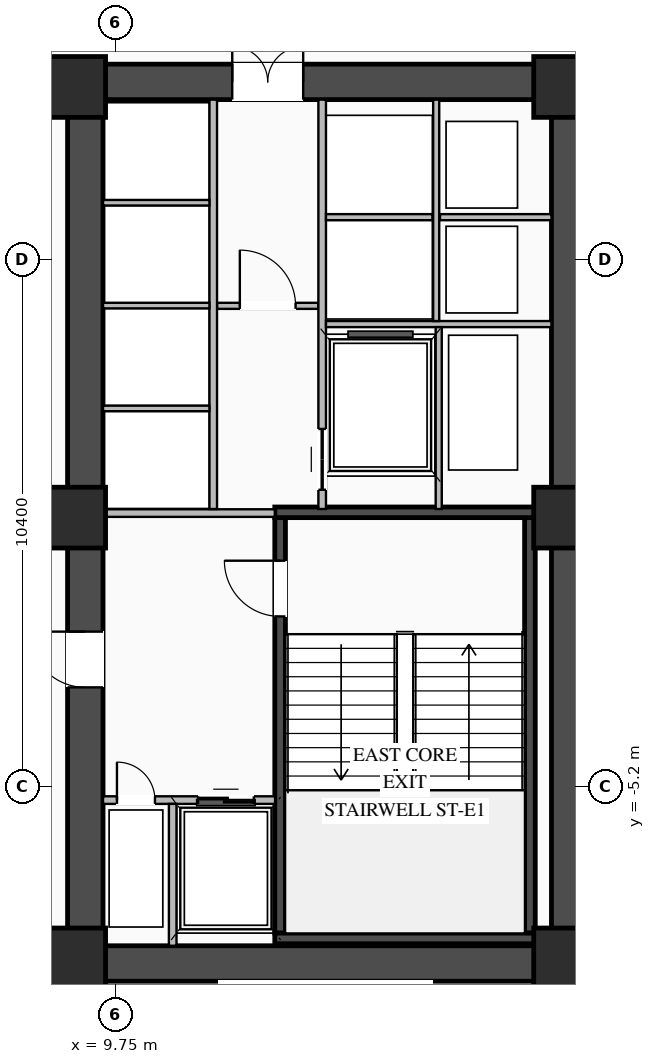
"""IFC4 building model, lengths in metres.
Left out: names, types, materials, properties, quantities, classifications, styles, units other than length and angle.
Written with IfcOpenShell. Run it as: python <this file> out.ifc"""

import sys

from ifc_helpers import new_model, si_unit, direction, frame, frame_2d, origin, origin_2d, place, context, subcontext, project, spatial, rectangle, extrude, element, fill, save


model = new_model("IFC4")
c1 = context("Model", 3, precision=1e-05, world=origin(), true_north=direction((0.0, 1.0)))
c2 = subcontext(c1, "Body", "Model", "MODEL_VIEW")
j1 = project(units=[si_unit("LENGTHUNIT", "METRE"), si_unit("PLANEANGLEUNIT", "RADIAN")], contexts=[c1])
p1 = place(None, origin())
s1 = spatial("IfcSite", under=j1, at=p1, CompositionType="ELEMENT")
p2 = place(p1, origin())
s2 = spatial("IfcBuilding", under=s1, at=p2, CompositionType="ELEMENT")
p3 = place(p2, frame((0.0, 0.0, 18.6)))
s3 = spatial("IfcBuildingStorey", under=s2, at=p3, CompositionType="ELEMENT", Elevation=18.6)
p4 = place(p3, frame((8.8, -8.7, 0.0), z_axis=(0.0, 0.0, 1.0), x_axis=(1.0, 0.0, 0.0)))
e1 = element("IfcWall", 1, at=p4, inside=s3, PredefinedType="SHEAR", context=c2, shape_type="SweptSolid", body=[
    extrude(rectangle(XDim=10.25, YDim=0.7, at=frame_2d((5.125, 0.0))), origin(), (0.0, 0.0, 1.0), 3.95),
])
p5 = place(p3, frame((8.8, 8.7, 0.0), z_axis=(0.0, 0.0, 1.0), x_axis=(1.0, 0.0, 0.0)))
e2 = element("IfcWall", 2, at=p5, inside=s3, PredefinedType="SHEAR", context=c2, shape_type="SweptSolid", body=[
    extrude(rectangle(XDim=10.25, YDim=0.7, at=frame_2d((5.125, 0.0))), origin(), (0.0, 0.0, 1.0), 3.95),
])
p6 = place(p5, frame((3.25, 0.0, 0.0)))
e3 = element("IfcOpeningElement", 3, at=p6, cuts=e2, PredefinedType="OPENING", context=c2, shape_type="SweptSolid", body=[
    extrude(rectangle(XDim=1.4, YDim=2.05, at=frame_2d((0.7, 1.025))), frame((0.0, 0.36, 0.0), z_axis=(0.0, -1.0, 0.0), x_axis=(1.0, 0.0, 0.0)), (0.0, 0.0, 1.0), 0.72),
])
p7 = place(p3, frame((9.15, -8.35, 0.0), z_axis=(0.0, 0.0, 1.0), x_axis=(0.0, 1.0, 0.0)))
e4 = element("IfcWall", 4, at=p7, inside=s3, PredefinedType="SHEAR", context=c2, shape_type="SweptSolid", body=[
    extrude(rectangle(XDim=16.7, YDim=0.7, at=frame_2d((8.35, 0.0))), origin(), (0.0, 0.0, 1.0), 3.95),
])
p8 = place(p7, frame((5.1, 0.0, 0.0)))
e5 = element("IfcOpeningElement", 5, at=p8, cuts=e4, PredefinedType="OPENING", context=c2, shape_type="SweptSolid", body=[
    extrude(rectangle(XDim=1.1, YDim=2.08, at=frame_2d((0.55, 1.04))), frame((0.0, 0.36, 0.0), z_axis=(0.0, -1.0, 0.0), x_axis=(1.0, 0.0, 0.0)), (0.0, 0.0, 1.0), 0.72),
])
p9 = place(p3, frame((18.7, -8.35, 0.0), z_axis=(0.0, 0.0, 1.0), x_axis=(0.0, 1.0, 0.0)))
e6 = element("IfcWall", 6, at=p9, inside=s3, PredefinedType="SHEAR", context=c2, shape_type="SweptSolid", body=[
    extrude(rectangle(XDim=16.7, YDim=0.7, at=frame_2d((8.35, 0.0))), origin(), (0.0, 0.0, 1.0), 3.95),
])
p10 = place(p3, frame((12.995, -8.1, 0.0), z_axis=(0.0, 0.0, 1.0), x_axis=(0.0, 1.0, 0.0)))
e7 = element("IfcWall", 7, at=p10, inside=s3, PredefinedType="SHEAR", context=c2, shape_type="SweptSolid", body=[
    extrude(rectangle(XDim=8.2, YDim=0.21, at=frame_2d((4.1, 0.0))), origin(), (0.0, 0.0, 1.0), 3.95),
])
p11 = place(p10, frame((6.25, 0.0, 0.0)))
e8 = element("IfcOpeningElement", 8, at=p11, cuts=e7, PredefinedType="OPENING", context=c2, shape_type="SweptSolid", body=[
    extrude(rectangle(XDim=1.1, YDim=2.15, at=frame_2d((0.55, 1.075))), frame((0.0, 0.115, 0.0), z_axis=(0.0, -1.0, 0.0), x_axis=(1.0, 0.0, 0.0)), (0.0, 0.0, 1.0), 0.23),
])
p12 = place(p3, frame((17.925, -8.1, 0.0), z_axis=(0.0, 0.0, 1.0), x_axis=(0.0, 1.0, 0.0)))
e9 = element("IfcWall", 9, at=p12, inside=s3, PredefinedType="SHEAR", context=c2, shape_type="SweptSolid", body=[
    extrude(rectangle(XDim=8.2, YDim=0.21, at=frame_2d((4.1, 0.0))), origin(), (0.0, 0.0, 1.0), 3.95),
])
for number, where, z_axis, x_axis in (
    (10, (12.89, -8.205, 0.0), (0.0, 0.0, 1.0), (1.0, 0.0, 0.0)),
    (11, (18.03, 0.205, 0.0), (0.0, 0.0, 1.0), (-1.0, 0.0, 0.0)),
):
    element("IfcWall", number, at=place(p3, frame(where, z_axis=z_axis, x_axis=x_axis)), inside=s3, PredefinedType="SHEAR", context=c2, shape_type="SweptSolid", body=[
        extrude(rectangle(XDim=5.14, YDim=0.21, at=frame_2d((2.57, 0.0))), origin(), (0.0, 0.0, 1.0), 3.95),
    ])
for number, where, z_axis, x_axis in (
    (12, (8.95, -8.6, 0.0), (0.0, 0.0, 1.0), (1.0, 0.0, 0.0)),
    (13, (8.95, 0.1, 0.0), (0.0, 0.0, 1.0), (1.0, 0.0, 0.0)),
    (14, (8.95, 8.6, 0.0), (0.0, 0.0, 1.0), (1.0, 0.0, 0.0)),
    (15, (18.6, -8.6, 0.0), (0.0, 0.0, 1.0), (1.0, 0.0, 0.0)),
    (16, (18.6, 0.1, 0.0), (0.0, 0.0, 1.0), (1.0, 0.0, 0.0)),
    (17, (18.6, 8.6, 0.0), (0.0, 0.0, 1.0), (1.0, 0.0, 0.0)),
):
    element("IfcColumn", number, at=place(p3, frame(where, z_axis=z_axis, x_axis=x_axis)), inside=s3, PredefinedType="COLUMN", context=c2, shape_type="SweptSolid", body=[
        extrude(rectangle(XDim=1.2, YDim=1.2, at=origin_2d()), origin(), (0.0, 0.0, 1.0), 4.2),
    ])
p13 = place(p3, frame((9.5, -5.475, 0.0), z_axis=(0.0, 0.0, 1.0), x_axis=(1.0, 0.0, 0.0)))
e18 = element("IfcWall", 18, at=p13, inside=s3, PredefinedType="STANDARD", context=c2, shape_type="SweptSolid", body=[
    extrude(rectangle(XDim=3.395, YDim=0.15, at=frame_2d((1.698, 0.0))), origin(), (0.0, 0.0, 1.0), 3.93),
])
p14 = place(p13, frame((1.875, 0.0, 0.0)))
e19 = element("IfcOpeningElement", 19, at=p14, cuts=e18, PredefinedType="OPENING", context=c2, shape_type="SweptSolid", body=[
    extrude(rectangle(XDim=1.1, YDim=2.15, at=frame_2d((0.55, 1.075))), frame((0.0, 0.085, 0.0), z_axis=(0.0, -1.0, 0.0), x_axis=(1.0, 0.0, 0.0)), (0.0, 0.0, 1.0), 0.17),
])
p15 = place(p13, frame((0.275, 0.0, 0.0)))
e20 = element("IfcOpeningElement", 20, at=p15, cuts=e18, PredefinedType="OPENING", context=c2, shape_type="SweptSolid", body=[
    extrude(rectangle(XDim=0.75, YDim=2.05, at=frame_2d((0.375, 1.025))), frame((0.0, 0.085, 0.0), z_axis=(0.0, -1.0, 0.0), x_axis=(1.0, 0.0, 0.0)), (0.0, 0.0, 1.0), 0.17),
])
p16 = place(p3, frame((10.875, -8.35, 0.0), z_axis=(0.0, 0.0, 1.0), x_axis=(0.0, 1.0, 0.0)))
e21 = element("IfcWall", 21, at=p16, inside=s3, PredefinedType="STANDARD", context=c2, shape_type="SweptSolid", body=[
    extrude(rectangle(XDim=2.8, YDim=0.15, at=frame_2d((1.4, 0.0))), origin(), (0.0, 0.0, 1.0), 3.93),
])
p17 = place(p3, frame((9.5, 0.19, 0.0), z_axis=(0.0, 0.0, 1.0), x_axis=(1.0, 0.0, 0.0)))
e22 = element("IfcWall", 22, at=p17, inside=s3, PredefinedType="STANDARD", context=c2, shape_type="SweptSolid", body=[
    extrude(rectangle(XDim=3.39, YDim=0.15, at=frame_2d((1.695, 0.0))), origin(), (0.0, 0.0, 1.0), 3.225),
])
p18 = place(p3, frame((11.75, 4.28, 0.0), z_axis=(0.0, 0.0, 1.0), x_axis=(1.0, 0.0, 0.0)))
e23 = element("IfcWall", 23, at=p18, inside=s3, PredefinedType="STANDARD", context=c2, shape_type="SweptSolid", body=[
    extrude(rectangle(XDim=2.0, YDim=0.12, at=frame_2d((1.0, 0.0))), origin(), (0.0, 0.0, 1.0), 3.93),
])
p19 = place(p18, frame((0.45, 0.0, 0.0)))
e24 = element("IfcOpeningElement", 24, at=p19, cuts=e23, PredefinedType="OPENING", context=c2, shape_type="SweptSolid", body=[
    extrude(rectangle(XDim=1.1, YDim=2.1, at=frame_2d((0.55, 1.05))), frame((0.0, 0.07, 0.0), z_axis=(0.0, -1.0, 0.0), x_axis=(1.0, 0.0, 0.0)), (0.0, 0.0, 1.0), 0.14),
])
p20 = place(p3, frame((11.675, 0.27, 0.0), z_axis=(0.0, 0.0, 1.0), x_axis=(0.0, 1.0, 0.0)))
e25 = element("IfcWall", 25, at=p20, inside=s3, PredefinedType="STANDARD", context=c2, shape_type="SweptSolid", body=[
    extrude(rectangle(XDim=8.08, YDim=0.15, at=frame_2d((4.04, 0.0))), origin(), (0.0, 0.0, 1.0), 3.93),
])
for number, where, z_axis, x_axis in (
    (26, (9.5, 2.255, 0.0), (0.0, 0.0, 1.0), (1.0, 0.0, 0.0)),
    (27, (9.5, 4.285, 0.0), (0.0, 0.0, 1.0), (1.0, 0.0, 0.0)),
    (28, (9.5, 6.315, 0.0), (0.0, 0.0, 1.0), (1.0, 0.0, 0.0)),
):
    element("IfcWall", number, at=place(p3, frame(where, z_axis=z_axis, x_axis=x_axis)), inside=s3, PredefinedType="STANDARD", context=c2, shape_type="SweptSolid", body=[
        extrude(rectangle(XDim=2.1, YDim=0.11, at=frame_2d((1.05, 0.0))), origin(), (0.0, 0.0, 1.0), 3.93),
    ])
p21 = place(p3, frame((13.825, 0.27, 0.0), z_axis=(0.0, 0.0, 1.0), x_axis=(0.0, 1.0, 0.0)))
e29 = element("IfcWall", 29, at=p21, inside=s3, PredefinedType="STANDARD", context=c2, shape_type="SweptSolid", body=[
    extrude(rectangle(XDim=8.08, YDim=0.15, at=frame_2d((4.04, 0.0))), origin(), (0.0, 0.0, 1.0), 3.93),
])
p22 = place(p21, frame((0.38, 0.0, 0.0)))
e30 = element("IfcOpeningElement", 30, at=p22, cuts=e29, PredefinedType="OPENING", context=c2, shape_type="SweptSolid", body=[
    extrude(rectangle(XDim=1.2, YDim=2.1, at=frame_2d((0.6, 1.05))), frame((0.0, 0.085, 0.0), z_axis=(0.0, -1.0, 0.0), x_axis=(1.0, 0.0, 0.0)), (0.0, 0.0, 1.0), 0.17),
])
p23 = place(p3, frame((13.9, 3.92, 0.0), z_axis=(0.0, 0.0, 1.0), x_axis=(1.0, 0.0, 0.0)))
e31 = element("IfcWall", 31, at=p23, inside=s3, PredefinedType="STANDARD", context=c2, shape_type="SweptSolid", body=[
    extrude(rectangle(XDim=4.45, YDim=0.12, at=frame_2d((2.225, 0.0))), origin(), (0.0, 0.0, 1.0), 3.93),
])
p24 = place(p3, frame((16.15, 6.03, 0.0), z_axis=(0.0, 0.0, 1.0), x_axis=(1.0, 0.0, 0.0)))
e32 = element("IfcWall", 32, at=p24, inside=s3, PredefinedType="STANDARD", context=c2, shape_type="SweptSolid", body=[
    extrude(rectangle(XDim=2.2, YDim=0.12, at=frame_2d((1.1, 0.0))), origin(), (0.0, 0.0, 1.0), 3.93),
])
p25 = place(p3, frame((16.075, 3.98, 0.0), z_axis=(0.0, 0.0, 1.0), x_axis=(0.0, 1.0, 0.0)))
e33 = element("IfcWall", 33, at=p25, inside=s3, PredefinedType="STANDARD", context=c2, shape_type="SweptSolid", body=[
    extrude(rectangle(XDim=4.37, YDim=0.12, at=frame_2d((2.185, 0.0))), origin(), (0.0, 0.0, 1.0), 3.93),
])
p26 = place(p3, frame((13.9, 6.03, 0.0), z_axis=(0.0, 0.0, 1.0), x_axis=(1.0, 0.0, 0.0)))
e34 = element("IfcWall", 34, at=p26, inside=s3, PredefinedType="STANDARD", context=c2, shape_type="SweptSolid", body=[
    extrude(rectangle(XDim=2.1, YDim=0.12, at=frame_2d((1.05, 0.0))), origin(), (0.0, 0.0, 1.0), 3.93),
])
p27 = place(p3, frame((16.125, 0.27, 0.0), z_axis=(0.0, 0.0, 1.0), x_axis=(0.0, 1.0, 0.0)))
e35 = element("IfcWall", 35, at=p27, inside=s3, PredefinedType="STANDARD", context=c2, shape_type="SweptSolid", body=[
    extrude(rectangle(XDim=3.59, YDim=0.12, at=frame_2d((1.795, 0.0))), origin(), (0.0, 0.0, 1.0), 3.93),
])
p28 = place(p11, origin())
e36 = element("IfcDoor", 36, at=p28, inside=s3, OperationType="SINGLE_SWING_RIGHT", PredefinedType="DOOR", context=c2, shape_type="SweptSolid", body=[
    extrude(rectangle(XDim=1.1, YDim=2.15, at=frame_2d((0.55, 1.075))), frame((0.0, 0.025, 0.0), z_axis=(0.0, -1.0, 0.0), x_axis=(1.0, 0.0, 0.0)), (0.0, 0.0, 1.0), 0.05),
])
fill(e8, e36)
p29 = place(p14, origin())
e37 = element("IfcDoor", 37, at=p29, inside=s3, OperationType="DOUBLE_DOOR_SLIDING", PredefinedType="DOOR", context=c2, shape_type="SweptSolid", body=[
    extrude(rectangle(XDim=1.1, YDim=2.15, at=frame_2d((0.55, 1.075))), frame((0.0, 0.025, 0.0), z_axis=(0.0, -1.0, 0.0), x_axis=(1.0, 0.0, 0.0)), (0.0, 0.0, 1.0), 0.05),
])
fill(e19, e37)
p30 = place(p15, origin())
e38 = element("IfcDoor", 38, at=p30, inside=s3, OperationType="SINGLE_SWING_LEFT", PredefinedType="DOOR", context=c2, shape_type="SweptSolid", body=[
    extrude(rectangle(XDim=0.75, YDim=2.05, at=frame_2d((0.375, 1.025))), frame((0.0, 0.025, 0.0), z_axis=(0.0, -1.0, 0.0), x_axis=(1.0, 0.0, 0.0)), (0.0, 0.0, 1.0), 0.05),
])
fill(e20, e38)
p31 = place(p8, origin())
e39 = element("IfcDoor", 39, at=p31, inside=s3, OperationType="SINGLE_SWING_RIGHT", PredefinedType="DOOR", context=c2, shape_type="SweptSolid", body=[
    extrude(rectangle(XDim=1.1, YDim=2.08, at=frame_2d((0.55, 1.04))), frame((0.0, -0.255, 0.0), z_axis=(0.0, -1.0, 0.0), x_axis=(1.0, 0.0, 0.0)), (0.0, 0.0, 1.0), 0.05),
])
fill(e5, e39)
p32 = place(p19, origin())
e40 = element("IfcDoor", 40, at=p32, inside=s3, OperationType="SINGLE_SWING_LEFT", PredefinedType="DOOR", context=c2, shape_type="SweptSolid", body=[
    extrude(rectangle(XDim=1.1, YDim=2.1, at=frame_2d((0.55, 1.05))), frame((0.0, 0.025, 0.0), z_axis=(0.0, -1.0, 0.0), x_axis=(1.0, 0.0, 0.0)), (0.0, 0.0, 1.0), 0.05),
])
fill(e24, e40)
p33 = place(p6, origin())
e41 = element("IfcDoor", 41, at=p33, inside=s3, OperationType="DOUBLE_DOOR_SINGLE_SWING", PredefinedType="DOOR", context=c2, shape_type="SweptSolid", body=[
    extrude(rectangle(XDim=1.4, YDim=2.05, at=frame_2d((0.7, 1.025))), frame((0.0, 0.295, 0.0), z_axis=(0.0, -1.0, 0.0), x_axis=(1.0, 0.0, 0.0)), (0.0, 0.0, 1.0), 0.05),
])
fill(e3, e41)
p34 = place(p22, origin())
e42 = element("IfcDoor", 42, at=p34, inside=s3, OperationType="DOUBLE_DOOR_SLIDING", PredefinedType="DOOR", context=c2, shape_type="SweptSolid", body=[
    extrude(rectangle(XDim=1.2, YDim=2.1, at=frame_2d((0.6, 1.05))), frame((0.0, 0.025, 0.0), z_axis=(0.0, -1.0, 0.0), x_axis=(1.0, 0.0, 0.0)), (0.0, 0.0, 1.0), 0.05),
])
fill(e30, e42)
save(model, sys.argv[1])
